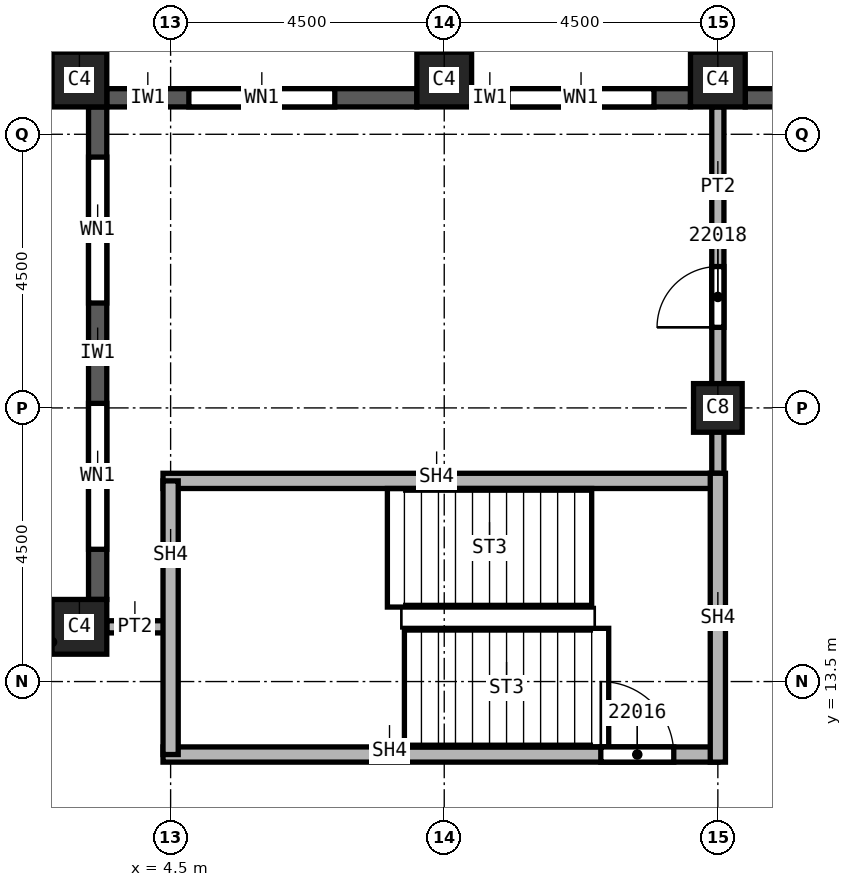
"""IFC4 building model, lengths in metres.
Left out: names, types, materials, properties, quantities, classifications, styles, units other than length and angle.
Written with IfcOpenShell. Run it as: python <this file> out.ifc"""

import sys

from ifc_helpers import new_model, si_unit, direction, frame, frame_2d, origin, origin_2d, place, context, subcontext, project, spatial, rectangle, extrude, element, fill, save


model = new_model("IFC4")
c1 = context("Model", 3, precision=1e-05, world=origin(), true_north=direction((0.0, 1.0)))
c2 = subcontext(c1, "Body", "Model", "MODEL_VIEW")
j1 = project(units=[si_unit("LENGTHUNIT", "METRE"), si_unit("PLANEANGLEUNIT", "RADIAN")], contexts=[c1])
p1 = place(None, origin())
s1 = spatial("IfcSite", under=j1, at=p1, CompositionType="ELEMENT")
p2 = place(p1, origin())
s2 = spatial("IfcBuilding", under=s1, at=p2, CompositionType="ELEMENT")
p3 = place(p2, frame((0.0, 0.0, 316.0)))
s3 = spatial("IfcBuildingStorey", under=s2, at=p3, CompositionType="ELEMENT", Elevation=316.0)
p4 = place(p3, frame((13.5, 18.0, 0.0), z_axis=(0.0, 0.0, 1.0), x_axis=(1.0, 0.0, 0.0)))
e1 = element("IfcColumn", 1, at=p4, inside=s3, PredefinedType="COLUMN", context=c2, shape_type="SweptSolid", body=[
    extrude(rectangle(XDim=0.8, YDim=0.8, at=origin_2d()), origin(), (0.0, 0.0, 1.0), 3.59),
])
for number, where, z_axis, x_axis in (
    (2, (3.0, 23.4, 0.0), (0.0, 0.0, 1.0), (1.0, 0.0, 0.0)),
    (3, (9.0, 23.4, 0.0), (0.0, 0.0, 1.0), (1.0, 0.0, 0.0)),
    (4, (13.5, 23.4, 0.0), (0.0, 0.0, 1.0), (1.0, 0.0, 0.0)),
    (5, (3.0, 14.4, 0.0), (0.0, 0.0, 1.0), (1.0, 0.0, 0.0)),
):
    element("IfcColumn", number, at=place(p3, frame(where, z_axis=z_axis, x_axis=x_axis)), inside=s3, PredefinedType="COLUMN", context=c2, shape_type="SweptSolid", body=[
        extrude(rectangle(XDim=0.9, YDim=0.9, at=origin_2d()), origin(), (0.0, 0.0, 1.0), 3.59),
    ])
p5 = place(p3, frame((17.55, 23.1, 0.0), z_axis=(0.0, 0.0, 1.0), x_axis=(-1.0, 0.0, 0.0)))
e6 = element("IfcWall", 6, at=p5, inside=s3, PredefinedType="SOLIDWALL", context=c2, shape_type="SweptSolid", body=[
    extrude(rectangle(XDim=3.6, YDim=0.3, at=frame_2d((1.8, 0.0))), origin(), (0.0, 0.0, 1.0), 2.99),
])
p6 = place(p5, frame((0.775, 0.0, 0.8)))
e7 = element("IfcOpeningElement", 7, at=p6, cuts=e6, PredefinedType="OPENING", context=c2, shape_type="SweptSolid", body=[
    extrude(rectangle(XDim=1.0, YDim=1.95, at=frame_2d((0.5, 0.975))), frame((0.0, 0.15, 0.0), z_axis=(0.0, -1.0, 0.0), x_axis=(1.0, 0.0, 0.0)), (0.0, 0.0, 1.0), 0.3),
])
p7 = place(p5, frame((2.375, 0.0, 0.8)))
e8 = element("IfcOpeningElement", 8, at=p7, cuts=e6, PredefinedType="OPENING", context=c2, shape_type="SweptSolid", body=[
    extrude(rectangle(XDim=0.6, YDim=1.95, at=frame_2d((0.3, 0.975))), frame((0.0, 0.15, 0.0), z_axis=(0.0, -1.0, 0.0), x_axis=(1.0, 0.0, 0.0)), (0.0, 0.0, 1.0), 0.3),
])
p8 = place(p3, frame((13.05, 23.1, 0.0), z_axis=(0.0, 0.0, 1.0), x_axis=(-1.0, 0.0, 0.0)))
e9 = element("IfcWall", 9, at=p8, inside=s3, PredefinedType="SOLIDWALL", context=c2, shape_type="SweptSolid", body=[
    extrude(rectangle(XDim=3.6, YDim=0.3, at=frame_2d((1.8, 0.0))), origin(), (0.0, 0.0, 1.0), 2.99),
])
p9 = place(p8, frame((0.6, 0.0, 0.8)))
e10 = element("IfcOpeningElement", 10, at=p9, cuts=e9, PredefinedType="OPENING", context=c2, shape_type="SweptSolid", body=[
    extrude(rectangle(XDim=2.4, YDim=1.95, at=frame_2d((1.2, 0.975))), frame((0.0, 0.15, 0.0), z_axis=(0.0, -1.0, 0.0), x_axis=(1.0, 0.0, 0.0)), (0.0, 0.0, 1.0), 0.3),
])
p10 = place(p3, frame((8.55, 23.1, 0.0), z_axis=(0.0, 0.0, 1.0), x_axis=(-1.0, 0.0, 0.0)))
e11 = element("IfcWall", 11, at=p10, inside=s3, PredefinedType="SOLIDWALL", context=c2, shape_type="SweptSolid", body=[
    extrude(rectangle(XDim=5.1, YDim=0.3, at=frame_2d((2.55, 0.0))), origin(), (0.0, 0.0, 1.0), 2.99),
])
p11 = place(p10, frame((1.35, 0.0, 0.8)))
e12 = element("IfcOpeningElement", 12, at=p11, cuts=e11, PredefinedType="OPENING", context=c2, shape_type="SweptSolid", body=[
    extrude(rectangle(XDim=2.4, YDim=1.95, at=frame_2d((1.2, 0.975))), frame((0.0, 0.15, 0.0), z_axis=(0.0, -1.0, 0.0), x_axis=(1.0, 0.0, 0.0)), (0.0, 0.0, 1.0), 0.3),
])
p12 = place(p3, frame((3.3, 22.95, 0.0), z_axis=(0.0, 0.0, 1.0), x_axis=(0.0, -1.0, 0.0)))
e13 = element("IfcWall", 13, at=p12, inside=s3, PredefinedType="SOLIDWALL", context=c2, shape_type="SweptSolid", body=[
    extrude(rectangle(XDim=8.1, YDim=0.3, at=frame_2d((4.05, 0.0))), origin(), (0.0, 0.0, 1.0), 2.99),
])
p13 = place(p12, frame((0.825, 0.0, 0.8)))
e14 = element("IfcOpeningElement", 14, at=p13, cuts=e13, PredefinedType="OPENING", context=c2, shape_type="SweptSolid", body=[
    extrude(rectangle(XDim=2.4, YDim=1.95, at=frame_2d((1.2, 0.975))), frame((0.0, 0.15, 0.0), z_axis=(0.0, -1.0, 0.0), x_axis=(1.0, 0.0, 0.0)), (0.0, 0.0, 1.0), 0.3),
])
p14 = place(p12, frame((4.875, 0.0, 0.8)))
e15 = element("IfcOpeningElement", 15, at=p14, cuts=e13, PredefinedType="OPENING", context=c2, shape_type="SweptSolid", body=[
    extrude(rectangle(XDim=2.4, YDim=1.95, at=frame_2d((1.2, 0.975))), frame((0.0, 0.15, 0.0), z_axis=(0.0, -1.0, 0.0), x_axis=(1.0, 0.0, 0.0)), (0.0, 0.0, 1.0), 0.3),
])
p15 = place(p3, frame((3.45, 14.4, 0.0), z_axis=(0.0, 0.0, 1.0), x_axis=(1.0, 0.0, 0.0)))
e16 = element("IfcWall", 16, at=p15, inside=s3, PredefinedType="PARTITIONING", context=c2, shape_type="SweptSolid", body=[
    extrude(rectangle(XDim=1.05, YDim=0.2, at=frame_2d((0.525, 0.0))), origin(), (0.0, 0.0, 1.0), 3.59),
])
p16 = place(p3, frame((13.5, 16.675, 0.0), z_axis=(0.0, 0.0, 1.0), x_axis=(0.0, 1.0, 0.0)))
e17 = element("IfcWall", 17, at=p16, inside=s3, PredefinedType="PARTITIONING", context=c2, shape_type="SweptSolid", body=[
    extrude(rectangle(XDim=6.275, YDim=0.2, at=frame_2d((3.137, 0.0))), origin(), (0.0, 0.0, 1.0), 3.59),
])
p17 = place(p16, frame((2.65, 0.0, 0.0)))
e18 = element("IfcOpeningElement", 18, at=p17, cuts=e17, PredefinedType="OPENING", context=c2, shape_type="SweptSolid", body=[
    extrude(rectangle(XDim=1.0, YDim=2.1, at=frame_2d((0.5, 1.05))), frame((0.0, 0.1, 0.0), z_axis=(0.0, -1.0, 0.0), x_axis=(1.0, 0.0, 0.0)), (0.0, 0.0, 1.0), 0.2),
])
p18 = place(p3, frame((4.375, 12.3, 0.0), z_axis=(0.0, 0.0, 1.0), x_axis=(1.0, 0.0, 0.0)))
e19 = element("IfcWall", 19, at=p18, inside=s3, PredefinedType="SOLIDWALL", context=c2, shape_type="SweptSolid", body=[
    extrude(rectangle(XDim=9.125, YDim=0.25, at=frame_2d((4.562, 0.0))), origin(), (0.0, 0.0, 1.0), 3.59),
])
p19 = place(p18, frame((7.2, 0.0, 0.0)))
e20 = element("IfcOpeningElement", 20, at=p19, cuts=e19, PredefinedType="OPENING", context=c2, shape_type="SweptSolid", body=[
    extrude(rectangle(XDim=1.2, YDim=2.1, at=frame_2d((0.6, 1.05))), frame((0.0, 0.125, 0.0), z_axis=(0.0, -1.0, 0.0), x_axis=(1.0, 0.0, 0.0)), (0.0, 0.0, 1.0), 0.25),
])
p20 = place(p3, frame((4.375, 16.8, 0.0), z_axis=(0.0, 0.0, 1.0), x_axis=(1.0, 0.0, 0.0)))
e21 = element("IfcWall", 21, at=p20, inside=s3, PredefinedType="SOLIDWALL", context=c2, shape_type="SweptSolid", body=[
    extrude(rectangle(XDim=9.125, YDim=0.25, at=frame_2d((4.562, 0.0))), origin(), (0.0, 0.0, 1.0), 3.59),
])
p21 = place(p3, frame((4.5, 12.3, 0.0), z_axis=(0.0, 0.0, 1.0), x_axis=(0.0, 1.0, 0.0)))
e22 = element("IfcWall", 22, at=p21, inside=s3, PredefinedType="SOLIDWALL", context=c2, shape_type="SweptSolid", body=[
    extrude(rectangle(XDim=4.5, YDim=0.25, at=frame_2d((2.25, 0.0))), origin(), (0.0, 0.0, 1.0), 3.59),
])
p22 = place(p3, frame((13.5, 12.175, 0.0), z_axis=(0.0, 0.0, 1.0), x_axis=(0.0, 1.0, 0.0)))
e23 = element("IfcWall", 23, at=p22, inside=s3, PredefinedType="SOLIDWALL", context=c2, shape_type="SweptSolid", body=[
    extrude(rectangle(XDim=4.75, YDim=0.25, at=frame_2d((2.375, 0.0))), origin(), (0.0, 0.0, 1.0), 3.59),
])
p23 = place(p9, origin())
e24 = element("IfcWindow", 24, at=p23, inside=s3, PartitioningType="SINGLE_PANEL", PredefinedType="WINDOW", context=c2, shape_type="SweptSolid", body=[
    extrude(rectangle(XDim=2.4, YDim=1.95, at=frame_2d((1.2, 0.975))), frame((0.0, 0.03, 0.0), z_axis=(0.0, -1.0, 0.0), x_axis=(1.0, 0.0, 0.0)), (0.0, 0.0, 1.0), 0.06),
])
fill(e10, e24)
p24 = place(p11, origin())
e25 = element("IfcWindow", 25, at=p24, inside=s3, PartitioningType="SINGLE_PANEL", PredefinedType="WINDOW", context=c2, shape_type="SweptSolid", body=[
    extrude(rectangle(XDim=2.4, YDim=1.95, at=frame_2d((1.2, 0.975))), frame((0.0, 0.03, 0.0), z_axis=(0.0, -1.0, 0.0), x_axis=(1.0, 0.0, 0.0)), (0.0, 0.0, 1.0), 0.06),
])
fill(e12, e25)
p25 = place(p13, origin())
e26 = element("IfcWindow", 26, at=p25, inside=s3, PartitioningType="SINGLE_PANEL", PredefinedType="WINDOW", context=c2, shape_type="SweptSolid", body=[
    extrude(rectangle(XDim=2.4, YDim=1.95, at=frame_2d((1.2, 0.975))), frame((0.0, 0.03, 0.0), z_axis=(0.0, -1.0, 0.0), x_axis=(1.0, 0.0, 0.0)), (0.0, 0.0, 1.0), 0.06),
])
fill(e14, e26)
p26 = place(p14, origin())
e27 = element("IfcWindow", 27, at=p26, inside=s3, PartitioningType="SINGLE_PANEL", PredefinedType="WINDOW", context=c2, shape_type="SweptSolid", body=[
    extrude(rectangle(XDim=2.4, YDim=1.95, at=frame_2d((1.2, 0.975))), frame((0.0, 0.03, 0.0), z_axis=(0.0, -1.0, 0.0), x_axis=(1.0, 0.0, 0.0)), (0.0, 0.0, 1.0), 0.06),
])
fill(e15, e27)
p27 = place(p19, origin())
e28 = element("IfcDoor", 28, at=p27, inside=s3, OperationType="SINGLE_SWING_LEFT", PredefinedType="DOOR", context=c2, shape_type="SweptSolid", body=[
    extrude(rectangle(XDim=1.2, YDim=2.1, at=frame_2d((0.6, 1.05))), frame((0.0, 0.025, 0.0), z_axis=(0.0, -1.0, 0.0), x_axis=(1.0, 0.0, 0.0)), (0.0, 0.0, 1.0), 0.05),
])
fill(e20, e28)
p28 = place(p17, origin())
e29 = element("IfcDoor", 29, at=p28, inside=s3, OperationType="SINGLE_SWING_LEFT", PredefinedType="DOOR", context=c2, shape_type="SweptSolid", body=[
    extrude(rectangle(XDim=1.0, YDim=2.1, at=frame_2d((0.5, 1.05))), frame((0.0, 0.025, 0.0), z_axis=(0.0, -1.0, 0.0), x_axis=(1.0, 0.0, 0.0)), (0.0, 0.0, 1.0), 0.05),
])
fill(e18, e29)
save(model, sys.argv[1])
